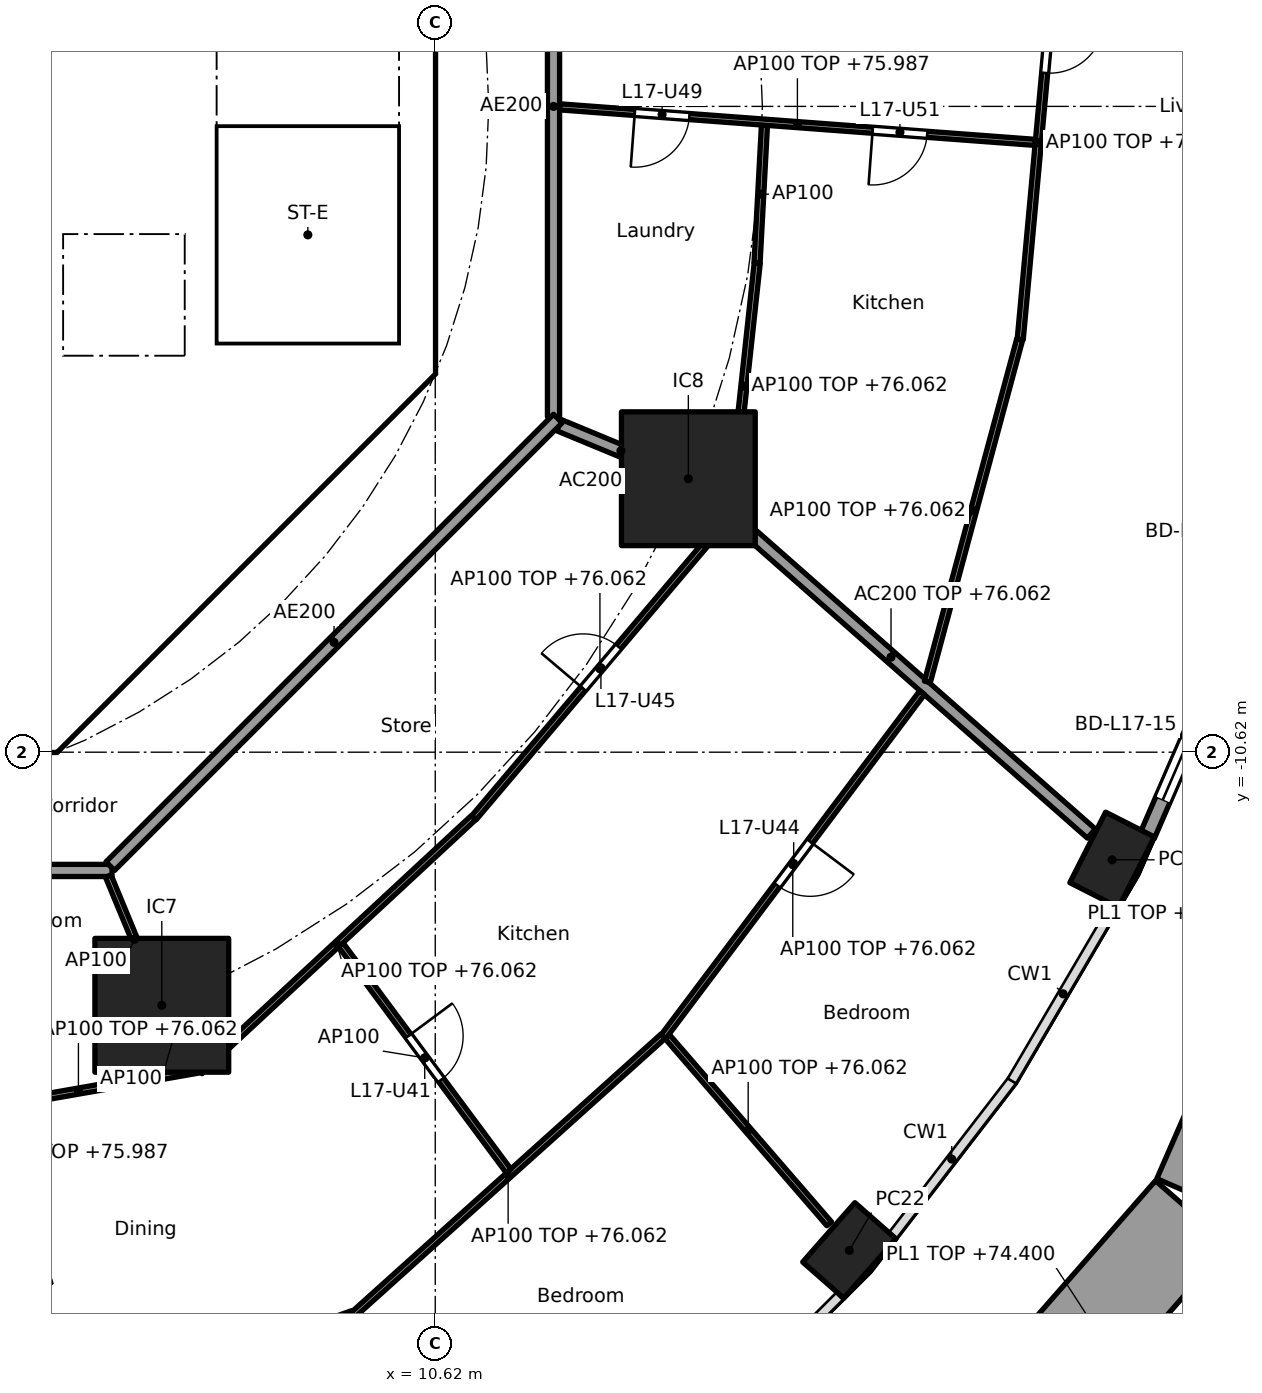
"""IFC4 building model, lengths in metres.
Left out: names, types, materials, properties, quantities, classifications, styles, units other than length and angle.
Written with IfcOpenShell. Run it as: python <this file> out.ifc"""

import sys

from ifc_helpers import new_model, si_unit, direction, frame, frame_2d, origin, origin_2d, place, context, subcontext, project, spatial, polyline, rectangle, hollow_rectangle, outline, extrude, element, fill, save


model = new_model("IFC4")
c1 = context("Model", 3, precision=1e-05, world=origin(), true_north=direction((0.0, 1.0)))
c2 = subcontext(c1, "Body", "Model", "MODEL_VIEW")
j1 = project(units=[si_unit("LENGTHUNIT", "METRE"), si_unit("PLANEANGLEUNIT", "RADIAN")], contexts=[c1])
p1 = place(None, origin())
s1 = spatial("IfcSite", under=j1, at=p1, CompositionType="ELEMENT")
p2 = place(p1, origin())
s2 = spatial("IfcBuilding", under=s1, at=p2, CompositionType="ELEMENT")
p3 = place(p2, frame((0.0, 0.0, 73.3)))
s3 = spatial("IfcBuildingStorey", under=s2, at=p3, CompositionType="ELEMENT", Elevation=73.3)
for number, where, z_axis, x_axis in (
    (1, (17.43, -18.813, -0.26), (0.0, 0.0, 1.0), (0.66, 0.751, 0.0)),
    (2, (21.751, -12.39, -0.26), (0.0, 0.0, 1.0), (0.452, 0.892, 0.0)),
):
    element("IfcColumn", number, at=place(p3, frame(where, z_axis=z_axis, x_axis=x_axis)), inside=s3, PredefinedType="COLUMN", context=c2, shape_type="SweptSolid", body=[
        extrude(hollow_rectangle(XDim=1.3, YDim=0.9, WallThickness=0.045, at=origin_2d()), origin(), (0.0, 0.0, 1.0), 3.96),
    ])
for number, where, z_axis, x_axis in (
    (3, (6.123, -14.782, 0.0), (0.0, 0.0, 1.0), (1.0, 0.0, 0.0)),
    (4, (14.782, -6.123, 0.0), (0.0, 0.0, 1.0), (1.0, 0.0, 0.0)),
):
    element("IfcColumn", number, at=place(p3, frame(where, z_axis=z_axis, x_axis=x_axis)), inside=s3, PredefinedType="COLUMN", context=c2, shape_type="SweptSolid", body=[
        extrude(rectangle(XDim=2.2, YDim=2.2, at=origin_2d()), origin(), (0.0, 0.0, 1.0), 3.7),
    ])
p4 = place(p3, frame((23.672, -8.893, 0.0), z_axis=(0.0, 0.0, 1.0), x_axis=(-0.397621629246, -0.917549475481, 0.0)))
e5 = element("IfcWall", 5, at=p4, inside=s3, PredefinedType="SOLIDWALL", context=c2, shape_type="SweptSolid", body=[
    extrude(rectangle(XDim=3.379, YDim=0.25, at=frame_2d((1.69, 0.0))), origin(), (0.0, 0.0, 1.0), 3.44),
])
p5 = place(p4, frame((0.64, 0.0, 0.0)))
e6 = element("IfcOpeningElement", 6, at=p5, cuts=e5, PredefinedType="OPENING", context=c2, shape_type="SweptSolid", body=[
    extrude(rectangle(XDim=2.1, YDim=2.4, at=frame_2d((1.05, 1.2))), frame((0.0, 0.135, 0.0), z_axis=(0.0, -1.0, 0.0), x_axis=(1.0, 0.0, 0.0)), (0.0, 0.0, 1.0), 0.27),
])
p6 = place(p3, frame((25.423, -19.465, 0.0), z_axis=(0.0, 0.0, 1.0), x_axis=(-0.707707630173, -0.706505421208, 0.0)))
e7 = element("IfcWall", 7, at=p6, inside=s3, PredefinedType="SOLIDWALL", context=c2, shape_type="SweptSolid", body=[
    extrude(rectangle(XDim=11.169, YDim=1.6, at=frame_2d((5.584, 0.0))), origin(), (0.0, 0.0, 1.0), 1.1),
])
p7 = place(p3, frame((19.822, -21.898, 0.0), z_axis=(0.0, 0.0, 1.0), x_axis=(0.658911677727, 0.752220314107, 0.0)))
e8 = element("IfcWall", 8, at=p7, inside=s3, PredefinedType="SOLIDWALL", context=c2, shape_type="SweptSolid", body=[
    extrude(rectangle(XDim=4.924, YDim=1.6, at=frame_2d((2.462, 0.0))), origin(), (0.0, 0.0, 1.0), 1.1),
])
p8 = place(p3, frame((23.219, -17.954, 0.0), z_axis=(0.0, 0.0, 1.0), x_axis=(0.40049126799, 0.916300575283, 0.0)))
e9 = element("IfcWall", 9, at=p8, inside=s3, PredefinedType="SOLIDWALL", context=c2, shape_type="SweptSolid", body=[
    extrude(rectangle(XDim=7.664, YDim=1.6, at=frame_2d((3.832, 0.0))), origin(), (0.0, 0.0, 1.0), 1.1),
])
p9 = place(p3, frame((4.613, -9.988, 0.0), z_axis=(0.0, 0.0, 1.0), x_axis=(0.707106781187, 0.707106781187, 0.0)))
e10 = element("IfcWall", 10, at=p9, inside=s3, PredefinedType="SHEAR", context=c2, shape_type="SweptSolid", body=[
    extrude(rectangle(XDim=7.602, YDim=0.6, at=frame_2d((3.801, 0.0))), origin(), (0.0, 0.0, 1.0), 3.44),
])
p10 = place(p9, frame((3.201, 0.0, 0.0)))
e11 = element("IfcOpeningElement", 11, at=p10, cuts=e10, PredefinedType="OPENING", context=c2, shape_type="SweptSolid", body=[
    extrude(rectangle(XDim=1.2, YDim=2.1, at=frame_2d((0.6, 1.05))), frame((0.0, 0.31, 0.0), z_axis=(0.0, -1.0, 0.0), x_axis=(1.0, 0.0, 0.0)), (0.0, 0.0, 1.0), 0.62),
])
p11 = place(p3, frame((-6.7, -2.0, 0.0), z_axis=(0.0, 0.0, 1.0), x_axis=(1.0, 0.0, 0.0)))
e12 = element("IfcWall", 12, at=p11, inside=s3, PredefinedType="SOLIDWALL", context=c2, shape_type="SweptSolid", body=[
    extrude(rectangle(XDim=13.4, YDim=0.2, at=frame_2d((6.7, 0.0))), origin(), (0.0, 0.0, 1.0), 3.44),
])
p12 = place(p11, frame((0.65, 0.0, 0.0)))
e13 = element("IfcOpeningElement", 13, at=p12, cuts=e12, PredefinedType="OPENING", context=c2, shape_type="SweptSolid", body=[
    extrude(rectangle(XDim=1.1, YDim=2.1, at=frame_2d((0.55, 1.05))), frame((0.0, 0.11, 0.0), z_axis=(0.0, -1.0, 0.0), x_axis=(1.0, 0.0, 0.0)), (0.0, 0.0, 1.0), 0.22),
])
p13 = place(p11, frame((2.85, 0.0, 0.0)))
e14 = element("IfcOpeningElement", 14, at=p13, cuts=e12, PredefinedType="OPENING", context=c2, shape_type="SweptSolid", body=[
    extrude(rectangle(XDim=1.1, YDim=2.1, at=frame_2d((0.55, 1.05))), frame((0.0, 0.11, 0.0), z_axis=(0.0, -1.0, 0.0), x_axis=(1.0, 0.0, 0.0)), (0.0, 0.0, 1.0), 0.22),
])
p14 = place(p3, origin())
e15 = element("IfcWall", 15, at=p14, inside=s3, PredefinedType="SHEAR", context=c2, shape_type="SweptSolid", body=[
    extrude(outline(polyline([(-4.152, -10.025), (4.152, -10.025), (4.401, -9.776), (4.825, -10.2), (4.401, -10.625), (-4.401, -10.625), (-4.825, -10.2), (-4.401, -9.776), (-4.152, -10.025)])), origin(), (0.0, 0.0, 1.0), 3.44),
])
p15 = place(p3, origin())
e16 = element("IfcWall", 16, at=p15, inside=s3, PredefinedType="SHEAR", context=c2, shape_type="SweptSolid", body=[
    extrude(outline(polyline([(9.776, -4.401), (10.025, -4.152), (10.025, -3.801), (10.025, 4.152), (9.776, 4.401), (10.2, 4.825), (10.625, 4.401), (10.625, -4.401), (10.2, -4.825), (9.776, -4.401)])), origin(), (0.0, 0.0, 1.0), 3.44),
])
p16 = place(p3, origin())
e17 = element("IfcWall", 17, at=p16, inside=s3, PredefinedType="SOLIDWALL", context=c2, shape_type="SweptSolid", body=[
    extrude(outline(polyline([(-6.7, -2.1), (-6.5, -2.1), (-6.5, -4.1), (-4.5, -4.1), (-4.5, -2.1), (-4.3, -2.1), (-4.3, -4.1), (-2.3, -4.1), (-2.3, -2.1), (-2.1, -2.1), (-2.1, -4.1), (-0.1, -4.1), (-0.1, -2.1), (0.1, -2.1), (0.1, -4.1), (2.1, -4.1), (2.1, -2.1), (2.3, -2.1), (2.3, -4.1), (4.3, -4.1), (4.3, -2.1), (4.5, -2.1), (4.5, -4.1), (6.5, -4.1), (6.5, -2.1), (6.7, -2.1), (6.7, -4.3), (-6.7, -4.3), (-6.7, -2.1)])), origin(), (0.0, 0.0, 1.0), 3.44),
])
p17 = place(p3, origin())
e18 = element("IfcWall", 18, at=p17, inside=s3, PredefinedType="SOLIDWALL", context=c2, shape_type="SweptSolid", body=[
    extrude(outline(polyline([(7.025, -3.9), (6.7, -3.9), (6.7, 3.9), (7.025, 3.9), (7.025, -3.9)])), origin(), (0.0, 0.0, 1.0), 3.44),
])
p18 = place(p3, origin())
e19 = element("IfcWall", 19, at=p18, inside=s3, PredefinedType="SOLIDWALL", context=c2, shape_type="SweptSolid", body=[
    extrude(outline(polyline([(10.025, -4.1), (6.7, -4.1), (6.7, -3.9), (10.025, -3.9), (10.025, -4.1)])), origin(), (0.0, 0.0, 1.0), 3.44),
])
p19 = place(p3, frame((12.657, -5.243, 0.0), z_axis=(0.0, 0.0, 1.0), x_axis=(0.923876145736, -0.382691608661, 0.0)))
e20 = element("IfcWall", 20, at=p19, inside=s3, PredefinedType="PARTITIONING", context=c2, shape_type="SweptSolid", body=[
    extrude(rectangle(XDim=2.2, YDim=0.2, at=frame_2d((1.1, 0.0))), origin(), (0.0, 0.0, 1.0), 3.44),
])
p20 = place(p3, frame((14.82, -6.156, 0.0), z_axis=(0.0, 0.0, 1.0), x_axis=(0.750582231659, -0.660777052808, 0.0)))
e21 = element("IfcWall", 21, at=p20, inside=s3, PredefinedType="PARTITIONING", context=c2, shape_type="SweptSolid", body=[
    extrude(rectangle(XDim=8.781, YDim=0.2, at=frame_2d((4.391, 0.0))), origin(), (0.0, 0.0, 1.0), 2.762),
])
p21 = place(p3, frame((12.565, -5.104, 0.0), z_axis=(0.0, 0.0, 1.0), x_axis=(0.0, 1.0, 0.0)))
e22 = element("IfcWall", 22, at=p21, inside=s3, PredefinedType="PARTITIONING", context=c2, shape_type="SweptSolid", body=[
    extrude(rectangle(XDim=10.209, YDim=0.2, at=frame_2d((5.104, 0.0))), origin(), (0.0, 0.0, 1.0), 3.44),
])
p22 = place(p21, frame((6.339, 0.0, 0.0)))
e23 = element("IfcOpeningElement", 23, at=p22, cuts=e22, PredefinedType="OPENING", context=c2, shape_type="SweptSolid", body=[
    extrude(rectangle(XDim=1.0, YDim=2.1, at=frame_2d((0.5, 1.05))), frame((0.0, 0.11, 0.0), z_axis=(0.0, -1.0, 0.0), x_axis=(1.0, 0.0, 0.0)), (0.0, 0.0, 1.0), 0.22),
])
p23 = place(p3, frame((-5.104, -12.565, 0.0), z_axis=(0.0, 0.0, 1.0), x_axis=(1.0, 0.0, 0.0)))
e24 = element("IfcWall", 24, at=p23, inside=s3, PredefinedType="PARTITIONING", context=c2, shape_type="SweptSolid", body=[
    extrude(rectangle(XDim=10.409, YDim=0.2, at=frame_2d((5.205, 0.0))), origin(), (0.0, 0.0, 1.0), 3.44),
])
p24 = place(p23, frame((4.604, 0.0, 0.0)))
e25 = element("IfcOpeningElement", 25, at=p24, cuts=e24, PredefinedType="OPENING", context=c2, shape_type="SweptSolid", body=[
    extrude(rectangle(XDim=1.0, YDim=2.1, at=frame_2d((0.5, 1.05))), frame((0.0, 0.11, 0.0), z_axis=(0.0, -1.0, 0.0), x_axis=(1.0, 0.0, 0.0)), (0.0, 0.0, 1.0), 0.22),
])
p25 = place(p3, frame((5.275, -12.494, 0.0), z_axis=(0.0, 0.0, 1.0), x_axis=(0.707106781187, 0.707106781187, 0.0)))
e26 = element("IfcWall", 26, at=p25, inside=s3, PredefinedType="PARTITIONING", context=c2, shape_type="SweptSolid", body=[
    extrude(rectangle(XDim=10.409, YDim=0.2, at=frame_2d((5.205, 0.0))), origin(), (0.0, 0.0, 1.0), 3.44),
])
p26 = place(p3, frame((20.834, 2.642, 0.0), z_axis=(0.0, 0.0, 1.0), x_axis=(-0.091385407685, -0.995815599025, 0.0)))
e27 = element("IfcWall", 27, at=p26, inside=s3, PredefinedType="PARTITIONING", context=c2, shape_type="SweptSolid", body=[
    extrude(rectangle(XDim=6.502, YDim=0.1, at=frame_2d((3.251, 0.0))), origin(), (0.0, 0.0, 1.0), 2.762),
])
p27 = place(p26, frame((1.201, 0.0, 0.0)))
e28 = element("IfcOpeningElement", 28, at=p27, cuts=e27, PredefinedType="OPENING", context=c2, shape_type="SweptSolid", body=[
    extrude(rectangle(XDim=0.9, YDim=2.1, at=frame_2d((0.45, 1.05))), frame((0.0, 0.06, 0.0), z_axis=(0.0, -1.0, 0.0), x_axis=(1.0, 0.0, 0.0)), (0.0, 0.0, 1.0), 0.12),
])
p28 = place(p3, frame((2.765, -16.541, 0.0), z_axis=(0.0, 0.0, 1.0), x_axis=(0.985002709003, 0.172538874623, 0.0)))
e29 = element("IfcWall", 29, at=p28, inside=s3, PredefinedType="PARTITIONING", context=c2, shape_type="SweptSolid", body=[
    extrude(rectangle(XDim=4.034, YDim=0.1, at=frame_2d((2.017, 0.0))), origin(), (0.0, 0.0, 1.0), 2.762),
])
p29 = place(p3, frame((4.034, -21.698, 0.0), z_axis=(0.0, 0.0, 1.0), x_axis=(0.942864271692, 0.333177077794, 0.0)))
e30 = element("IfcWall", 30, at=p29, inside=s3, PredefinedType="PARTITIONING", context=c2, shape_type="SweptSolid", body=[
    extrude(rectangle(XDim=5.545, YDim=0.1, at=frame_2d((2.772, 0.0))), origin(), (0.0, 0.0, 1.0), 2.762),
])
p30 = place(p3, frame((5.243, -12.657, 0.0), z_axis=(0.0, 0.0, 1.0), x_axis=(0.382719158442, -0.923864733477, 0.0)))
e31 = element("IfcWall", 31, at=p30, inside=s3, PredefinedType="PARTITIONING", context=c2, shape_type="SweptSolid", body=[
    extrude(rectangle(XDim=2.25, YDim=0.1, at=frame_2d((1.125, 0.0))), origin(), (0.0, 0.0, 1.0), 3.44),
])
p31 = place(p3, frame((6.751, -15.87, 0.0), z_axis=(0.0, 0.0, 1.0), x_axis=(0.733003105791, 0.680225291283, 0.0)))
e32 = element("IfcWall", 32, at=p31, inside=s3, PredefinedType="PARTITIONING", context=c2, shape_type="SweptSolid", body=[
    extrude(rectangle(XDim=6.138, YDim=0.1, at=frame_2d((3.069, 0.0))), origin(), (0.0, 0.0, 1.0), 2.762),
])
p32 = place(p3, frame((9.336, -19.877, 0.0), z_axis=(0.0, 0.0, 1.0), x_axis=(0.533525984139, -0.845783674617, 0.0)))
e33 = element("IfcWall", 33, at=p32, inside=s3, PredefinedType="PARTITIONING", context=c2, shape_type="SweptSolid", body=[
    extrude(rectangle(XDim=4.033, YDim=0.1, at=frame_2d((2.016, 0.0))), origin(), (0.0, 0.0, 1.0), 2.762),
])
p33 = place(p32, frame((1.566, 0.0, 0.0)))
e34 = element("IfcOpeningElement", 34, at=p33, cuts=e33, PredefinedType="OPENING", context=c2, shape_type="SweptSolid", body=[
    extrude(rectangle(XDim=0.9, YDim=2.1, at=frame_2d((0.45, 1.05))), frame((0.0, 0.06, 0.0), z_axis=(0.0, -1.0, 0.0), x_axis=(1.0, 0.0, 0.0)), (0.0, 0.0, 1.0), 0.12),
])
p34 = place(p3, frame((9.272, -19.868, 0.0), z_axis=(0.0, 0.0, 1.0), x_axis=(0.743884413566, 0.668308296562, 0.0)))
e35 = element("IfcWall", 35, at=p34, inside=s3, PredefinedType="PARTITIONING", context=c2, shape_type="SweptSolid", body=[
    extrude(rectangle(XDim=6.845, YDim=0.1, at=frame_2d((3.423, 0.0))), origin(), (0.0, 0.0, 1.0), 2.762),
])
p35 = place(p3, frame((9.067, -13.789, 0.0), z_axis=(0.0, 0.0, 1.0), x_axis=(0.5958491185, -0.80309640018, 0.0)))
e36 = element("IfcWall", 36, at=p35, inside=s3, PredefinedType="PARTITIONING", context=c2, shape_type="SweptSolid", body=[
    extrude(rectangle(XDim=4.63, YDim=0.1, at=frame_2d((2.315, 0.0))), origin(), (0.0, 0.0, 1.0), 3.44),
])
p36 = place(p35, frame((1.865, 0.0, 0.0)))
e37 = element("IfcOpeningElement", 37, at=p36, cuts=e36, PredefinedType="OPENING", context=c2, shape_type="SweptSolid", body=[
    extrude(rectangle(XDim=0.9, YDim=2.1, at=frame_2d((0.45, 1.05))), frame((0.0, 0.06, 0.0), z_axis=(0.0, -1.0, 0.0), x_axis=(1.0, 0.0, 0.0)), (0.0, 0.0, 1.0), 0.12),
])
p37 = place(p3, frame((11.255, -11.699, 0.0), z_axis=(0.0, 0.0, 1.0), x_axis=(0.646107653745, 0.763246290375, 0.0)))
e38 = element("IfcWall", 38, at=p37, inside=s3, PredefinedType="PARTITIONING", context=c2, shape_type="SweptSolid", body=[
    extrude(rectangle(XDim=6.417, YDim=0.1, at=frame_2d((3.208, 0.0))), origin(), (0.0, 0.0, 1.0), 2.762),
])
p38 = place(p37, frame((2.784, 0.0, 0.0)))
e39 = element("IfcOpeningElement", 39, at=p38, cuts=e38, PredefinedType="OPENING", context=c2, shape_type="SweptSolid", body=[
    extrude(rectangle(XDim=0.9, YDim=2.1, at=frame_2d((0.45, 1.05))), frame((0.0, 0.06, 0.0), z_axis=(0.0, -1.0, 0.0), x_axis=(1.0, 0.0, 0.0)), (0.0, 0.0, 1.0), 0.12),
])
p39 = place(p3, frame((14.435, -15.297, 0.0), z_axis=(0.0, 0.0, 1.0), x_axis=(0.654405107766, -0.756144136345, 0.0)))
e40 = element("IfcWall", 40, at=p39, inside=s3, PredefinedType="PARTITIONING", context=c2, shape_type="SweptSolid", body=[
    extrude(rectangle(XDim=4.07, YDim=0.1, at=frame_2d((2.035, 0.0))), origin(), (0.0, 0.0, 1.0), 2.762),
])
p40 = place(p3, frame((14.372, -15.3, 0.0), z_axis=(0.0, 0.0, 1.0), x_axis=(0.600987107857, 0.79925871668, 0.0)))
e41 = element("IfcWall", 41, at=p40, inside=s3, PredefinedType="PARTITIONING", context=c2, shape_type="SweptSolid", body=[
    extrude(rectangle(XDim=7.08, YDim=0.1, at=frame_2d((3.54, 0.0))), origin(), (0.0, 0.0, 1.0), 2.762),
])
p41 = place(p40, frame((3.115, 0.0, 0.0)))
e42 = element("IfcOpeningElement", 42, at=p41, cuts=e41, PredefinedType="OPENING", context=c2, shape_type="SweptSolid", body=[
    extrude(rectangle(XDim=0.9, YDim=2.1, at=frame_2d((0.45, 1.05))), frame((0.0, 0.06, 0.0), z_axis=(0.0, -1.0, 0.0), x_axis=(1.0, 0.0, 0.0)), (0.0, 0.0, 1.0), 0.12),
])
p42 = place(p3, frame((15.477, -6.625, 0.0), z_axis=(0.0, 0.0, 1.0), x_axis=(0.107561928907, 0.994198386365, 0.0)))
e43 = element("IfcWall", 43, at=p42, inside=s3, PredefinedType="PARTITIONING", context=c2, shape_type="SweptSolid", body=[
    extrude(rectangle(XDim=4.072, YDim=0.1, at=frame_2d((2.036, 0.0))), origin(), (0.0, 0.0, 1.0), 2.762),
])
p43 = place(p3, frame((18.713, -9.464, 0.0), z_axis=(0.0, 0.0, 1.0), x_axis=(0.260279646259, 0.965533275316, 0.0)))
e44 = element("IfcWall", 44, at=p43, inside=s3, PredefinedType="PARTITIONING", context=c2, shape_type="SweptSolid", body=[
    extrude(rectangle(XDim=5.833, YDim=0.1, at=frame_2d((2.917, 0.0))), origin(), (0.0, 0.0, 1.0), 2.762),
])
p44 = place(p3, frame((15.912, -2.577, 0.0), z_axis=(0.0, 0.0, 1.0), x_axis=(0.053749298185, 0.998554461682, 0.0)))
e45 = element("IfcWall", 45, at=p44, inside=s3, PredefinedType="PARTITIONING", context=c2, shape_type="SweptSolid", body=[
    extrude(rectangle(XDim=2.271, YDim=0.1, at=frame_2d((1.135, 0.0))), origin(), (0.0, 0.0, 1.0), 3.44),
])
p45 = place(p3, frame((12.665, -0.008, 0.0), z_axis=(0.0, 0.0, 1.0), x_axis=(0.997222647159, -0.074478130978, 0.0)))
e46 = element("IfcWall", 46, at=p45, inside=s3, PredefinedType="PARTITIONING", context=c2, shape_type="SweptSolid", body=[
    extrude(rectangle(XDim=7.844, YDim=0.1, at=frame_2d((3.922, 0.0))), origin(), (0.0, 0.0, 1.0), 2.687),
])
p46 = place(p45, frame((1.241, 0.0, 0.0)))
e47 = element("IfcOpeningElement", 47, at=p46, cuts=e46, PredefinedType="OPENING", context=c2, shape_type="SweptSolid", body=[
    extrude(rectangle(XDim=0.9, YDim=2.1, at=frame_2d((0.45, 1.05))), frame((0.0, 0.06, 0.0), z_axis=(0.0, -1.0, 0.0), x_axis=(1.0, 0.0, 0.0)), (0.0, 0.0, 1.0), 0.12),
])
p47 = place(p45, frame((5.163, 0.0, 0.0)))
e48 = element("IfcOpeningElement", 48, at=p47, cuts=e46, PredefinedType="OPENING", context=c2, shape_type="SweptSolid", body=[
    extrude(rectangle(XDim=0.9, YDim=2.1, at=frame_2d((0.45, 1.05))), frame((0.0, 0.06, 0.0), z_axis=(0.0, -1.0, 0.0), x_axis=(1.0, 0.0, 0.0)), (0.0, 0.0, 1.0), 0.12),
])
p48 = place(p3, frame((6.051, -14.855, 0.0), z_axis=(0.0, 0.0, 1.0), x_axis=(0.533542828537, -0.845773048824, 0.0)))
e49 = element("IfcWall", 49, at=p48, inside=s3, PredefinedType="PARTITIONING", context=c2, shape_type="SweptSolid", body=[
    extrude(rectangle(XDim=1.021, YDim=0.1, at=frame_2d((0.51, 0.0))), origin(), (0.0, 0.0, 1.0), 3.44),
])
p49 = place(p5, origin())
e50 = element("IfcDoor", 50, at=p49, inside=s3, OperationType="SLIDING_TO_LEFT", PredefinedType="DOOR", context=c2, shape_type="SweptSolid", body=[
    extrude(rectangle(XDim=2.1, YDim=2.4, at=frame_2d((1.05, 1.2))), frame((0.0, 0.025, 0.0), z_axis=(0.0, -1.0, 0.0), x_axis=(1.0, 0.0, 0.0)), (0.0, 0.0, 1.0), 0.05),
])
fill(e6, e50)
p50 = place(p10, origin())
e51 = element("IfcDoor", 51, at=p50, inside=s3, OperationType="SINGLE_SWING_LEFT", PredefinedType="DOOR", context=c2, shape_type="SweptSolid", body=[
    extrude(rectangle(XDim=1.2, YDim=2.1, at=frame_2d((0.6, 1.05))), frame((0.0, 0.025, 0.0), z_axis=(0.0, -1.0, 0.0), x_axis=(1.0, 0.0, 0.0)), (0.0, 0.0, 1.0), 0.05),
])
fill(e11, e51)
p51 = place(p36, origin())
e52 = element("IfcDoor", 52, at=p51, inside=s3, OperationType="SINGLE_SWING_LEFT", PredefinedType="DOOR", context=c2, shape_type="SweptSolid", body=[
    extrude(rectangle(XDim=0.9, YDim=2.1, at=frame_2d((0.45, 1.05))), frame((0.0, 0.025, 0.0), z_axis=(0.0, -1.0, 0.0), x_axis=(1.0, 0.0, 0.0)), (0.0, 0.0, 1.0), 0.05),
])
fill(e37, e52)
p52 = place(p41, frame((0.9, 0.0, 0.0), x_axis=(-1.0, 0.0, 0.0)))
e53 = element("IfcDoor", 53, at=p52, inside=s3, OperationType="SINGLE_SWING_LEFT", PredefinedType="DOOR", context=c2, shape_type="SweptSolid", body=[
    extrude(rectangle(XDim=0.9, YDim=2.1, at=frame_2d((0.45, 1.05))), frame((0.0, 0.025, 0.0), z_axis=(0.0, -1.0, 0.0), x_axis=(1.0, 0.0, 0.0)), (0.0, 0.0, 1.0), 0.05),
])
fill(e42, e53)
p53 = place(p38, origin())
e54 = element("IfcDoor", 54, at=p53, inside=s3, OperationType="SINGLE_SWING_LEFT", PredefinedType="DOOR", context=c2, shape_type="SweptSolid", body=[
    extrude(rectangle(XDim=0.9, YDim=2.1, at=frame_2d((0.45, 1.05))), frame((0.0, 0.025, 0.0), z_axis=(0.0, -1.0, 0.0), x_axis=(1.0, 0.0, 0.0)), (0.0, 0.0, 1.0), 0.05),
])
fill(e39, e54)
p54 = place(p46, frame((0.9, 0.0, 0.0), x_axis=(-1.0, 0.0, 0.0)))
e55 = element("IfcDoor", 55, at=p54, inside=s3, OperationType="SINGLE_SWING_RIGHT", PredefinedType="DOOR", context=c2, shape_type="SweptSolid", body=[
    extrude(rectangle(XDim=0.9, YDim=2.1, at=frame_2d((0.45, 1.05))), frame((0.0, 0.025, 0.0), z_axis=(0.0, -1.0, 0.0), x_axis=(1.0, 0.0, 0.0)), (0.0, 0.0, 1.0), 0.05),
])
fill(e47, e55)
p55 = place(p47, frame((0.9, 0.0, 0.0), x_axis=(-1.0, 0.0, 0.0)))
e56 = element("IfcDoor", 56, at=p55, inside=s3, OperationType="SINGLE_SWING_RIGHT", PredefinedType="DOOR", context=c2, shape_type="SweptSolid", body=[
    extrude(rectangle(XDim=0.9, YDim=2.1, at=frame_2d((0.45, 1.05))), frame((0.0, 0.025, 0.0), z_axis=(0.0, -1.0, 0.0), x_axis=(1.0, 0.0, 0.0)), (0.0, 0.0, 1.0), 0.05),
])
fill(e48, e56)
p56 = place(p27, origin())
e57 = element("IfcDoor", 57, at=p56, inside=s3, OperationType="SINGLE_SWING_LEFT", PredefinedType="DOOR", context=c2, shape_type="SweptSolid", body=[
    extrude(rectangle(XDim=0.9, YDim=2.1, at=frame_2d((0.45, 1.05))), frame((0.0, 0.025, 0.0), z_axis=(0.0, -1.0, 0.0), x_axis=(1.0, 0.0, 0.0)), (0.0, 0.0, 1.0), 0.05),
])
fill(e28, e57)
save(model, sys.argv[1])
